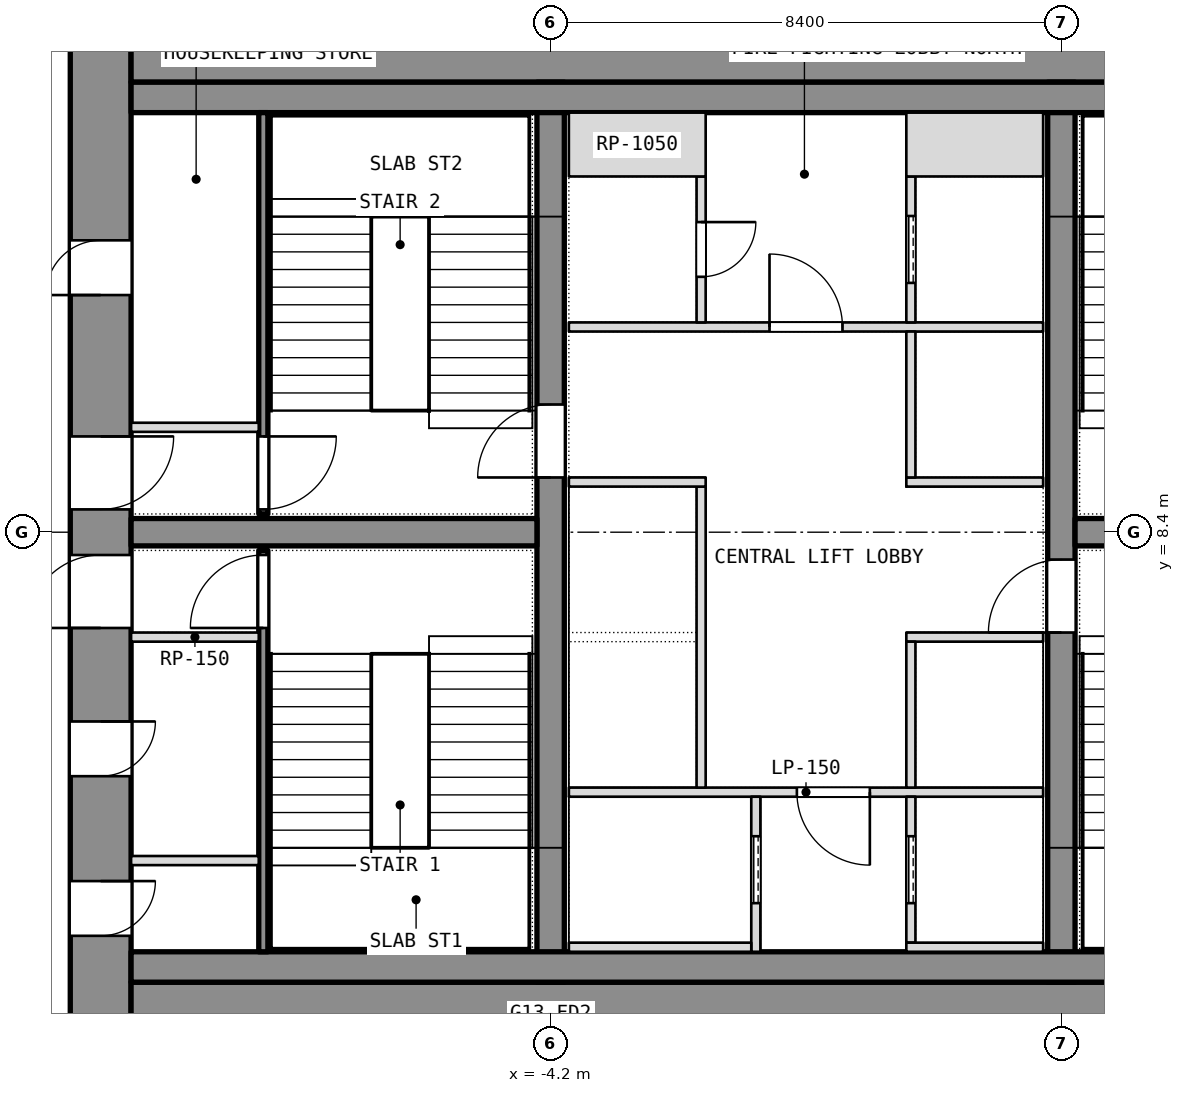
"""IFC4 building model, lengths in metres.
Left out: names, types, materials, properties, quantities, classifications, styles, units other than length and angle.
Written with IfcOpenShell. Run it as: python <this file> out.ifc"""

import sys

from ifc_helpers import new_model, si_unit, direction, frame, frame_2d, origin, place, context, subcontext, project, spatial, rectangle, extrude, element, fill, save


model = new_model("IFC4")
c1 = context("Model", 3, precision=1e-05, world=origin(), true_north=direction((0.0, 1.0)))
c2 = subcontext(c1, "Body", "Model", "MODEL_VIEW")
j1 = project(units=[si_unit("LENGTHUNIT", "METRE"), si_unit("PLANEANGLEUNIT", "RADIAN")], contexts=[c1])
p1 = place(None, origin())
s1 = spatial("IfcSite", under=j1, at=p1, CompositionType="ELEMENT")
p2 = place(p1, origin())
s2 = spatial("IfcBuilding", under=s1, at=p2, CompositionType="ELEMENT")
p3 = place(p2, frame((0.0, 0.0, 155.3)))
s3 = spatial("IfcBuildingStorey", under=s2, at=p3, CompositionType="ELEMENT", Elevation=155.3)
p4 = place(p3, frame((-11.6, 0.0, 0.0), z_axis=(0.0, 0.0, 1.0), x_axis=(0.0, 1.0, 0.0)))
e1 = element("IfcWall", 1, at=p4, inside=s3, PredefinedType="SHEAR", context=c2, shape_type="SweptSolid", body=[
    extrude(rectangle(XDim=16.8, YDim=1.0, at=frame_2d((8.4, 0.0))), origin(), (0.0, 0.0, 1.0), 3.6),
])
p5 = place(p4, frame((1.762, 0.0, 0.0)))
e2 = element("IfcOpeningElement", 2, at=p5, cuts=e1, PredefinedType="OPENING", context=c2, shape_type="SweptSolid", body=[
    extrude(rectangle(XDim=0.9, YDim=2.1, at=frame_2d((0.45, 1.05))), frame((0.0, 0.5, 0.0), z_axis=(0.0, -1.0, 0.0), x_axis=(1.0, 0.0, 0.0)), (0.0, 0.0, 1.0), 1.0),
])
p6 = place(p4, frame((4.387, 0.0, 0.0)))
e3 = element("IfcOpeningElement", 3, at=p6, cuts=e1, PredefinedType="OPENING", context=c2, shape_type="SweptSolid", body=[
    extrude(rectangle(XDim=0.9, YDim=2.1, at=frame_2d((0.45, 1.05))), frame((0.0, 0.5, 0.0), z_axis=(0.0, -1.0, 0.0), x_axis=(1.0, 0.0, 0.0)), (0.0, 0.0, 1.0), 1.0),
])
p7 = place(p4, frame((6.825, 0.0, 0.0)))
e4 = element("IfcOpeningElement", 4, at=p7, cuts=e1, PredefinedType="OPENING", context=c2, shape_type="SweptSolid", body=[
    extrude(rectangle(XDim=1.2, YDim=2.1, at=frame_2d((0.6, 1.05))), frame((0.0, 0.5, 0.0), z_axis=(0.0, -1.0, 0.0), x_axis=(1.0, 0.0, 0.0)), (0.0, 0.0, 1.0), 1.0),
])
p8 = place(p4, frame((12.3, 0.0, 0.0)))
e5 = element("IfcOpeningElement", 5, at=p8, cuts=e1, PredefinedType="OPENING", context=c2, shape_type="SweptSolid", body=[
    extrude(rectangle(XDim=0.9, YDim=2.1, at=frame_2d((0.45, 1.05))), frame((0.0, 0.5, 0.0), z_axis=(0.0, -1.0, 0.0), x_axis=(1.0, 0.0, 0.0)), (0.0, 0.0, 1.0), 1.0),
])
p9 = place(p4, frame((8.775, 0.0, 0.0)))
e6 = element("IfcOpeningElement", 6, at=p9, cuts=e1, PredefinedType="OPENING", context=c2, shape_type="SweptSolid", body=[
    extrude(rectangle(XDim=1.2, YDim=2.1, at=frame_2d((0.6, 1.05))), frame((0.0, 0.5, 0.0), z_axis=(0.0, -1.0, 0.0), x_axis=(1.0, 0.0, 0.0)), (0.0, 0.0, 1.0), 1.0),
])
for number, where, z_axis, x_axis in (
    (7, (-11.1, 0.5, 0.0), (0.0, 0.0, 1.0), (1.0, 0.0, 0.0)),
    (8, (-11.1, 16.3, 0.0), (0.0, 0.0, 1.0), (1.0, 0.0, 0.0)),
):
    element("IfcWall", number, at=place(p3, frame(where, z_axis=z_axis, x_axis=x_axis)), inside=s3, PredefinedType="SHEAR", context=c2, shape_type="SweptSolid", body=[
        extrude(rectangle(XDim=22.2, YDim=1.0, at=frame_2d((11.1, 0.0))), origin(), (0.0, 0.0, 1.0), 3.6),
    ])
p10 = place(p3, frame((-4.2, 1.0, 0.0), z_axis=(0.0, 0.0, 1.0), x_axis=(0.0, 1.0, 0.0)))
e9 = element("IfcWall", 9, at=p10, inside=s3, PredefinedType="SHEAR", context=c2, shape_type="SweptSolid", body=[
    extrude(rectangle(XDim=14.8, YDim=0.45, at=frame_2d((7.4, 0.0))), origin(), (0.0, 0.0, 1.0), 3.6),
])
p11 = place(p10, frame((8.3, 0.0, 0.0)))
e10 = element("IfcOpeningElement", 10, at=p11, cuts=e9, PredefinedType="OPENING", context=c2, shape_type="SweptSolid", body=[
    extrude(rectangle(XDim=1.2, YDim=2.1, at=frame_2d((0.6, 1.05))), frame((0.0, 0.225, 0.0), z_axis=(0.0, -1.0, 0.0), x_axis=(1.0, 0.0, 0.0)), (0.0, 0.0, 1.0), 0.45),
])
p12 = place(p3, frame((4.2, 1.0, 0.0), z_axis=(0.0, 0.0, 1.0), x_axis=(0.0, 1.0, 0.0)))
e11 = element("IfcWall", 11, at=p12, inside=s3, PredefinedType="SHEAR", context=c2, shape_type="SweptSolid", body=[
    extrude(rectangle(XDim=14.8, YDim=0.45, at=frame_2d((7.4, 0.0))), origin(), (0.0, 0.0, 1.0), 3.6),
])
p13 = place(p12, frame((5.75, 0.0, 0.0)))
e12 = element("IfcOpeningElement", 12, at=p13, cuts=e11, PredefinedType="OPENING", context=c2, shape_type="SweptSolid", body=[
    extrude(rectangle(XDim=1.2, YDim=2.1, at=frame_2d((0.6, 1.05))), frame((0.0, 0.225, 0.0), z_axis=(0.0, -1.0, 0.0), x_axis=(1.0, 0.0, 0.0)), (0.0, 0.0, 1.0), 0.45),
])
for number, where, z_axis, x_axis in (
    (13, (-11.1, 8.4, 0.0), (0.0, 0.0, 1.0), (1.0, 0.0, 0.0)),
    (14, (4.425, 8.4, 0.0), (0.0, 0.0, 1.0), (1.0, 0.0, 0.0)),
):
    element("IfcWall", number, at=place(p3, frame(where, z_axis=z_axis, x_axis=x_axis)), inside=s3, PredefinedType="SHEAR", context=c2, shape_type="SweptSolid", body=[
        extrude(rectangle(XDim=6.675, YDim=0.45, at=frame_2d((3.337, 0.0))), origin(), (0.0, 0.0, 1.0), 3.6),
    ])
for number, where, z_axis, x_axis in (
    (15, (-11.1, 1.25, 0.0), (0.0, 0.0, 1.0), (1.0, 0.0, 0.0)),
    (16, (-11.1, 15.55, 0.0), (0.0, 0.0, 1.0), (1.0, 0.0, 0.0)),
):
    element("IfcWall", number, at=place(p3, frame(where, z_axis=z_axis, x_axis=x_axis)), inside=s3, PredefinedType="PARTITIONING", context=c2, shape_type="SweptSolid", body=[
        extrude(rectangle(XDim=22.2, YDim=0.5, at=frame_2d((11.1, 0.0))), origin(), (0.0, 0.0, 1.0), 3.34),
    ])
p14 = place(p3, frame((-8.925, 1.5, 0.0), z_axis=(0.0, 0.0, 1.0), x_axis=(0.0, 1.0, 0.0)))
e17 = element("IfcWall", 17, at=p14, inside=s3, PredefinedType="SHEAR", context=c2, shape_type="SweptSolid", body=[
    extrude(rectangle(XDim=6.6, YDim=0.15, at=frame_2d((3.3, 0.0))), origin(), (0.0, 0.0, 1.0), 3.34),
])
p15 = place(p14, frame((5.325, 0.0, 0.0)))
e18 = element("IfcOpeningElement", 18, at=p15, cuts=e17, PredefinedType="OPENING", context=c2, shape_type="SweptSolid", body=[
    extrude(rectangle(XDim=1.2, YDim=2.1, at=frame_2d((0.6, 1.05))), frame((0.0, 0.075, 0.0), z_axis=(0.0, -1.0, 0.0), x_axis=(1.0, 0.0, 0.0)), (0.0, 0.0, 1.0), 0.15),
])
for number, where, z_axis, x_axis in (
    (19, (-11.1, 6.675, 0.0), (0.0, 0.0, 1.0), (1.0, 0.0, 0.0)),
    (20, (-11.1, 3.0, 0.0), (0.0, 0.0, 1.0), (1.0, 0.0, 0.0)),
):
    element("IfcWall", number, at=place(p3, frame(where, z_axis=z_axis, x_axis=x_axis)), inside=s3, PredefinedType="PARTITIONING", context=c2, shape_type="SweptSolid", body=[
        extrude(rectangle(XDim=2.1, YDim=0.15, at=frame_2d((1.05, 0.0))), origin(), (0.0, 0.0, 1.0), 3.34),
    ])
p16 = place(p3, frame((-8.925, 8.7, 0.0), z_axis=(0.0, 0.0, 1.0), x_axis=(0.0, 1.0, 0.0)))
e21 = element("IfcWall", 21, at=p16, inside=s3, PredefinedType="SHEAR", context=c2, shape_type="SweptSolid", body=[
    extrude(rectangle(XDim=6.6, YDim=0.15, at=frame_2d((3.3, 0.0))), origin(), (0.0, 0.0, 1.0), 3.34),
])
p17 = place(p16, frame((0.075, 0.0, 0.0)))
e22 = element("IfcOpeningElement", 22, at=p17, cuts=e21, PredefinedType="OPENING", context=c2, shape_type="SweptSolid", body=[
    extrude(rectangle(XDim=1.2, YDim=2.1, at=frame_2d((0.6, 1.05))), frame((0.0, 0.075, 0.0), z_axis=(0.0, -1.0, 0.0), x_axis=(1.0, 0.0, 0.0)), (0.0, 0.0, 1.0), 0.15),
])
p18 = place(p3, frame((-11.1, 10.125, 0.0), z_axis=(0.0, 0.0, 1.0), x_axis=(1.0, 0.0, 0.0)))
e23 = element("IfcWall", 23, at=p18, inside=s3, PredefinedType="PARTITIONING", context=c2, shape_type="SweptSolid", body=[
    extrude(rectangle(XDim=2.1, YDim=0.15, at=frame_2d((1.05, 0.0))), origin(), (0.0, 0.0, 1.0), 3.34),
])
p19 = place(p3, frame((-3.9, 4.125, 0.0), z_axis=(0.0, 0.0, 1.0), x_axis=(1.0, 0.0, 0.0)))
e24 = element("IfcWall", 24, at=p19, inside=s3, PredefinedType="PARTITIONING", context=c2, shape_type="SweptSolid", body=[
    extrude(rectangle(XDim=7.8, YDim=0.15, at=frame_2d((3.9, 0.0))), origin(), (0.0, 0.0, 1.0), 3.34),
])
p20 = place(p19, frame((3.75, 0.0, 0.0)))
e25 = element("IfcOpeningElement", 25, at=p20, cuts=e24, PredefinedType="OPENING", context=c2, shape_type="SweptSolid", body=[
    extrude(rectangle(XDim=1.2, YDim=2.1, at=frame_2d((0.6, 1.05))), frame((0.0, 0.075, 0.0), z_axis=(0.0, -1.0, 0.0), x_axis=(1.0, 0.0, 0.0)), (0.0, 0.0, 1.0), 0.15),
])
p21 = place(p3, frame((-3.9, 11.775, 0.0), z_axis=(0.0, 0.0, 1.0), x_axis=(1.0, 0.0, 0.0)))
e26 = element("IfcWall", 26, at=p21, inside=s3, PredefinedType="PARTITIONING", context=c2, shape_type="SweptSolid", body=[
    extrude(rectangle(XDim=7.8, YDim=0.15, at=frame_2d((3.9, 0.0))), origin(), (0.0, 0.0, 1.0), 3.34),
])
p22 = place(p21, frame((3.3, 0.0, 0.0)))
e27 = element("IfcOpeningElement", 27, at=p22, cuts=e26, PredefinedType="OPENING", context=c2, shape_type="SweptSolid", body=[
    extrude(rectangle(XDim=1.2, YDim=2.1, at=frame_2d((0.6, 1.05))), frame((0.0, 0.075, 0.0), z_axis=(0.0, -1.0, 0.0), x_axis=(1.0, 0.0, 0.0)), (0.0, 0.0, 1.0), 0.15),
])
p23 = place(p3, frame((-0.825, 1.5, 0.0), z_axis=(0.0, 0.0, 1.0), x_axis=(0.0, 1.0, 0.0)))
e28 = element("IfcWall", 28, at=p23, inside=s3, PredefinedType="SHEAR", context=c2, shape_type="SweptSolid", body=[
    extrude(rectangle(XDim=2.55, YDim=0.15, at=frame_2d((1.275, 0.0))), origin(), (0.0, 0.0, 1.0), 3.6),
])
p24 = place(p23, frame((0.8, 0.0, 0.0)))
e29 = element("IfcOpeningElement", 29, at=p24, cuts=e28, PredefinedType="OPENING", context=c2, shape_type="SweptSolid", body=[
    extrude(rectangle(XDim=1.1, YDim=2.1, at=frame_2d((0.55, 1.05))), frame((0.0, 0.075, 0.0), z_axis=(0.0, -1.0, 0.0), x_axis=(1.0, 0.0, 0.0)), (0.0, 0.0, 1.0), 0.15),
])
p25 = place(p3, frame((-3.9, 1.575, 0.0), z_axis=(0.0, 0.0, 1.0), x_axis=(1.0, 0.0, 0.0)))
e30 = element("IfcWall", 30, at=p25, inside=s3, PredefinedType="SHEAR", context=c2, shape_type="SweptSolid", body=[
    extrude(rectangle(XDim=3.0, YDim=0.15, at=frame_2d((1.5, 0.0))), origin(), (0.0, 0.0, 1.0), 3.6),
])
p26 = place(p3, frame((-1.725, 4.2, 0.0), z_axis=(0.0, 0.0, 1.0), x_axis=(0.0, 1.0, 0.0)))
e31 = element("IfcWall", 31, at=p26, inside=s3, PredefinedType="SHEAR", context=c2, shape_type="SweptSolid", body=[
    extrude(rectangle(XDim=4.95, YDim=0.15, at=frame_2d((2.475, 0.0))), origin(), (0.0, 0.0, 1.0), 3.6),
])
p27 = place(p3, frame((-3.9, 9.225, 0.0), z_axis=(0.0, 0.0, 1.0), x_axis=(1.0, 0.0, 0.0)))
e32 = element("IfcWall", 32, at=p27, inside=s3, PredefinedType="SHEAR", context=c2, shape_type="SweptSolid", body=[
    extrude(rectangle(XDim=2.25, YDim=0.15, at=frame_2d((1.125, 0.0))), origin(), (0.0, 0.0, 1.0), 3.6),
])
p28 = place(p3, frame((-1.725, 11.85, 0.0), z_axis=(0.0, 0.0, 1.0), x_axis=(0.0, 1.0, 0.0)))
e33 = element("IfcWall", 33, at=p28, inside=s3, PredefinedType="PARTITIONING", context=c2, shape_type="SweptSolid", body=[
    extrude(rectangle(XDim=2.4, YDim=0.15, at=frame_2d((1.2, 0.0))), origin(), (0.0, 0.0, 1.0), 3.34),
])
p29 = place(p28, frame((0.75, 0.0, 0.0)))
e34 = element("IfcOpeningElement", 34, at=p29, cuts=e33, PredefinedType="OPENING", context=c2, shape_type="SweptSolid", body=[
    extrude(rectangle(XDim=0.9, YDim=2.1, at=frame_2d((0.45, 1.05))), frame((0.0, 0.075, 0.0), z_axis=(0.0, -1.0, 0.0), x_axis=(1.0, 0.0, 0.0)), (0.0, 0.0, 1.0), 0.15),
])
p30 = place(p3, frame((-3.9, 14.775, 0.0), z_axis=(0.0, 0.0, 1.0), x_axis=(1.0, 0.0, 0.0)))
e35 = element("IfcWall", 35, at=p30, inside=s3, PredefinedType="PARTITIONING", context=c2, shape_type="SweptSolid", body=[
    extrude(rectangle(XDim=2.25, YDim=1.05, at=frame_2d((1.125, 0.0))), origin(), (0.0, 0.0, 1.0), 3.34),
])
p31 = place(p3, frame((1.725, 1.65, 0.0), z_axis=(0.0, 0.0, 1.0), x_axis=(0.0, 1.0, 0.0)))
e36 = element("IfcWall", 36, at=p31, inside=s3, PredefinedType="SHEAR", context=c2, shape_type="SweptSolid", body=[
    extrude(rectangle(XDim=2.4, YDim=0.15, at=frame_2d((1.2, 0.0))), origin(), (0.0, 0.0, 1.0), 3.6),
])
p32 = place(p31, frame((0.65, 0.0, 0.0)))
e37 = element("IfcOpeningElement", 37, at=p32, cuts=e36, PredefinedType="OPENING", context=c2, shape_type="SweptSolid", body=[
    extrude(rectangle(XDim=1.1, YDim=2.1, at=frame_2d((0.55, 1.05))), frame((0.0, 0.075, 0.0), z_axis=(0.0, -1.0, 0.0), x_axis=(1.0, 0.0, 0.0)), (0.0, 0.0, 1.0), 0.15),
])
p33 = place(p3, frame((1.65, 1.575, 0.0), z_axis=(0.0, 0.0, 1.0), x_axis=(1.0, 0.0, 0.0)))
e38 = element("IfcWall", 38, at=p33, inside=s3, PredefinedType="SHEAR", context=c2, shape_type="SweptSolid", body=[
    extrude(rectangle(XDim=2.25, YDim=0.15, at=frame_2d((1.125, 0.0))), origin(), (0.0, 0.0, 1.0), 3.6),
])
p34 = place(p3, frame((1.725, 11.85, 0.0), z_axis=(0.0, 0.0, 1.0), x_axis=(0.0, 1.0, 0.0)))
e39 = element("IfcWall", 39, at=p34, inside=s3, PredefinedType="SHEAR", context=c2, shape_type="SweptSolid", body=[
    extrude(rectangle(XDim=2.4, YDim=0.15, at=frame_2d((1.2, 0.0))), origin(), (0.0, 0.0, 1.0), 3.6),
])
p35 = place(p34, frame((0.65, 0.0, 0.0)))
e40 = element("IfcOpeningElement", 40, at=p35, cuts=e39, PredefinedType="OPENING", context=c2, shape_type="SweptSolid", body=[
    extrude(rectangle(XDim=1.1, YDim=2.1, at=frame_2d((0.55, 1.05))), frame((0.0, 0.075, 0.0), z_axis=(0.0, -1.0, 0.0), x_axis=(1.0, 0.0, 0.0)), (0.0, 0.0, 1.0), 0.15),
])
p36 = place(p3, frame((1.65, 14.775, 0.0), z_axis=(0.0, 0.0, 1.0), x_axis=(1.0, 0.0, 0.0)))
e41 = element("IfcWall", 41, at=p36, inside=s3, PredefinedType="SHEAR", context=c2, shape_type="SweptSolid", body=[
    extrude(rectangle(XDim=2.25, YDim=1.05, at=frame_2d((1.125, 0.0))), origin(), (0.0, 0.0, 1.0), 3.6),
])
for number, where, z_axis, x_axis in (
    (42, (1.65, 6.675, 0.0), (0.0, 0.0, 1.0), (1.0, 0.0, 0.0)),
    (43, (1.65, 9.225, 0.0), (0.0, 0.0, 1.0), (1.0, 0.0, 0.0)),
):
    element("IfcWall", number, at=place(p3, frame(where, z_axis=z_axis, x_axis=x_axis)), inside=s3, PredefinedType="SHEAR", context=c2, shape_type="SweptSolid", body=[
        extrude(rectangle(XDim=2.25, YDim=0.15, at=frame_2d((1.125, 0.0))), origin(), (0.0, 0.0, 1.0), 3.6),
    ])
p37 = place(p3, frame((1.725, 4.2, 0.0), z_axis=(0.0, 0.0, 1.0), x_axis=(0.0, 1.0, 0.0)))
e44 = element("IfcWall", 44, at=p37, inside=s3, PredefinedType="SHEAR", context=c2, shape_type="SweptSolid", body=[
    extrude(rectangle(XDim=2.4, YDim=0.15, at=frame_2d((1.2, 0.0))), origin(), (0.0, 0.0, 1.0), 3.6),
])
p38 = place(p3, frame((1.725, 9.3, 0.0), z_axis=(0.0, 0.0, 1.0), x_axis=(0.0, 1.0, 0.0)))
e45 = element("IfcWall", 45, at=p38, inside=s3, PredefinedType="SHEAR", context=c2, shape_type="SweptSolid", body=[
    extrude(rectangle(XDim=2.4, YDim=0.15, at=frame_2d((1.2, 0.0))), origin(), (0.0, 0.0, 1.0), 3.6),
])
p39 = place(p5, origin())
e46 = element("IfcDoor", 46, at=p39, inside=s3, OperationType="SINGLE_SWING_LEFT", PredefinedType="DOOR", context=c2, shape_type="SweptSolid", body=[
    extrude(rectangle(XDim=0.9, YDim=2.1, at=frame_2d((0.45, 1.05))), frame((0.0, 0.025, 0.0), z_axis=(0.0, -1.0, 0.0), x_axis=(1.0, 0.0, 0.0)), (0.0, 0.0, 1.0), 0.05),
])
fill(e2, e46)
p40 = place(p6, origin())
e47 = element("IfcDoor", 47, at=p40, inside=s3, OperationType="SINGLE_SWING_LEFT", PredefinedType="DOOR", context=c2, shape_type="SweptSolid", body=[
    extrude(rectangle(XDim=0.9, YDim=2.1, at=frame_2d((0.45, 1.05))), frame((0.0, 0.025, 0.0), z_axis=(0.0, -1.0, 0.0), x_axis=(1.0, 0.0, 0.0)), (0.0, 0.0, 1.0), 0.05),
])
fill(e3, e47)
p41 = place(p7, origin())
e48 = element("IfcDoor", 48, at=p41, inside=s3, OperationType="SINGLE_SWING_LEFT", PredefinedType="DOOR", context=c2, shape_type="SweptSolid", body=[
    extrude(rectangle(XDim=1.2, YDim=2.1, at=frame_2d((0.6, 1.05))), frame((0.0, 0.025, 0.0), z_axis=(0.0, -1.0, 0.0), x_axis=(1.0, 0.0, 0.0)), (0.0, 0.0, 1.0), 0.05),
])
fill(e4, e48)
p42 = place(p15, origin())
e49 = element("IfcDoor", 49, at=p42, inside=s3, OperationType="SINGLE_SWING_LEFT", PredefinedType="DOOR", context=c2, shape_type="SweptSolid", body=[
    extrude(rectangle(XDim=1.2, YDim=2.1, at=frame_2d((0.6, 1.05))), frame((0.0, 0.025, 0.0), z_axis=(0.0, -1.0, 0.0), x_axis=(1.0, 0.0, 0.0)), (0.0, 0.0, 1.0), 0.05),
])
fill(e18, e49)
p43 = place(p8, origin())
e50 = element("IfcDoor", 50, at=p43, inside=s3, OperationType="SINGLE_SWING_LEFT", PredefinedType="DOOR", context=c2, shape_type="SweptSolid", body=[
    extrude(rectangle(XDim=0.9, YDim=2.1, at=frame_2d((0.45, 1.05))), frame((0.0, 0.025, 0.0), z_axis=(0.0, -1.0, 0.0), x_axis=(1.0, 0.0, 0.0)), (0.0, 0.0, 1.0), 0.05),
])
fill(e5, e50)
p44 = place(p9, origin())
e51 = element("IfcDoor", 51, at=p44, inside=s3, OperationType="SINGLE_SWING_LEFT", PredefinedType="DOOR", context=c2, shape_type="SweptSolid", body=[
    extrude(rectangle(XDim=1.2, YDim=2.1, at=frame_2d((0.6, 1.05))), frame((0.0, 0.025, 0.0), z_axis=(0.0, -1.0, 0.0), x_axis=(1.0, 0.0, 0.0)), (0.0, 0.0, 1.0), 0.05),
])
fill(e6, e51)
p45 = place(p17, origin())
e52 = element("IfcDoor", 52, at=p45, inside=s3, OperationType="SINGLE_SWING_LEFT", PredefinedType="DOOR", context=c2, shape_type="SweptSolid", body=[
    extrude(rectangle(XDim=1.2, YDim=2.1, at=frame_2d((0.6, 1.05))), frame((0.0, 0.025, 0.0), z_axis=(0.0, -1.0, 0.0), x_axis=(1.0, 0.0, 0.0)), (0.0, 0.0, 1.0), 0.05),
])
fill(e22, e52)
p46 = place(p24, origin())
e53 = element("IfcDoor", 53, at=p46, inside=s3, OperationType="SLIDING_TO_LEFT", PredefinedType="DOOR", context=c2, shape_type="SweptSolid", body=[
    extrude(rectangle(XDim=1.1, YDim=2.1, at=frame_2d((0.55, 1.05))), frame((0.0, 0.025, 0.0), z_axis=(0.0, -1.0, 0.0), x_axis=(1.0, 0.0, 0.0)), (0.0, 0.0, 1.0), 0.05),
])
fill(e29, e53)
p47 = place(p32, origin())
e54 = element("IfcDoor", 54, at=p47, inside=s3, OperationType="SLIDING_TO_LEFT", PredefinedType="DOOR", context=c2, shape_type="SweptSolid", body=[
    extrude(rectangle(XDim=1.1, YDim=2.1, at=frame_2d((0.55, 1.05))), frame((0.0, 0.025, 0.0), z_axis=(0.0, -1.0, 0.0), x_axis=(1.0, 0.0, 0.0)), (0.0, 0.0, 1.0), 0.05),
])
fill(e37, e54)
p48 = place(p35, origin())
e55 = element("IfcDoor", 55, at=p48, inside=s3, OperationType="SLIDING_TO_LEFT", PredefinedType="DOOR", context=c2, shape_type="SweptSolid", body=[
    extrude(rectangle(XDim=1.1, YDim=2.1, at=frame_2d((0.55, 1.05))), frame((0.0, 0.025, 0.0), z_axis=(0.0, -1.0, 0.0), x_axis=(1.0, 0.0, 0.0)), (0.0, 0.0, 1.0), 0.05),
])
fill(e40, e55)
p49 = place(p20, origin())
e56 = element("IfcDoor", 56, at=p49, inside=s3, OperationType="SINGLE_SWING_LEFT", PredefinedType="DOOR", context=c2, shape_type="SweptSolid", body=[
    extrude(rectangle(XDim=1.2, YDim=2.1, at=frame_2d((0.6, 1.05))), frame((0.0, 0.025, 0.0), z_axis=(0.0, -1.0, 0.0), x_axis=(1.0, 0.0, 0.0)), (0.0, 0.0, 1.0), 0.05),
])
fill(e25, e56)
p50 = place(p22, origin())
e57 = element("IfcDoor", 57, at=p50, inside=s3, OperationType="SINGLE_SWING_LEFT", PredefinedType="DOOR", context=c2, shape_type="SweptSolid", body=[
    extrude(rectangle(XDim=1.2, YDim=2.1, at=frame_2d((0.6, 1.05))), frame((0.0, 0.025, 0.0), z_axis=(0.0, -1.0, 0.0), x_axis=(1.0, 0.0, 0.0)), (0.0, 0.0, 1.0), 0.05),
])
fill(e27, e57)
p51 = place(p29, origin())
e58 = element("IfcDoor", 58, at=p51, inside=s3, OperationType="SINGLE_SWING_LEFT", PredefinedType="DOOR", context=c2, shape_type="SweptSolid", body=[
    extrude(rectangle(XDim=0.9, YDim=2.1, at=frame_2d((0.45, 1.05))), frame((0.0, 0.025, 0.0), z_axis=(0.0, -1.0, 0.0), x_axis=(1.0, 0.0, 0.0)), (0.0, 0.0, 1.0), 0.05),
])
fill(e34, e58)
p52 = place(p11, origin())
e59 = element("IfcDoor", 59, at=p52, inside=s3, OperationType="SINGLE_SWING_LEFT", PredefinedType="DOOR", context=c2, shape_type="SweptSolid", body=[
    extrude(rectangle(XDim=1.2, YDim=2.1, at=frame_2d((0.6, 1.05))), frame((0.0, 0.025, 0.0), z_axis=(0.0, -1.0, 0.0), x_axis=(1.0, 0.0, 0.0)), (0.0, 0.0, 1.0), 0.05),
])
fill(e10, e59)
p53 = place(p13, origin())
e60 = element("IfcDoor", 60, at=p53, inside=s3, OperationType="SINGLE_SWING_LEFT", PredefinedType="DOOR", context=c2, shape_type="SweptSolid", body=[
    extrude(rectangle(XDim=1.2, YDim=2.1, at=frame_2d((0.6, 1.05))), frame((0.0, 0.025, 0.0), z_axis=(0.0, -1.0, 0.0), x_axis=(1.0, 0.0, 0.0)), (0.0, 0.0, 1.0), 0.05),
])
fill(e12, e60)
save(model, sys.argv[1])
